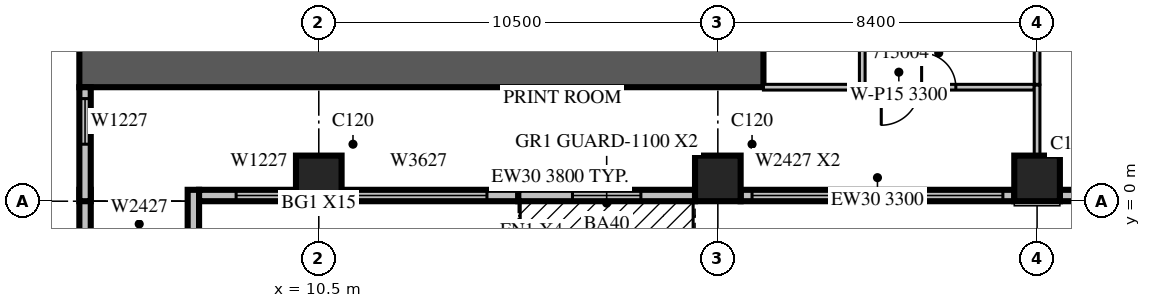
"""IFC4 building model, lengths in metres.
Left out: names, types, materials, properties, quantities, classifications, styles, units other than length and angle.
Written with IfcOpenShell. Run it as: python <this file> out.ifc"""

import sys

from ifc_helpers import new_model, si_unit, direction, frame, frame_2d, origin, origin_2d, place, context, subcontext, project, spatial, rectangle, extrude, source, transform, mapped, element, fill, save


model = new_model("IFC4")
c1 = context("Model", 3, precision=1e-05, world=origin(), true_north=direction((0.0, 1.0)))
c2 = subcontext(c1, "Body", "Model", "MODEL_VIEW")
j1 = project(units=[si_unit("LENGTHUNIT", "METRE"), si_unit("PLANEANGLEUNIT", "RADIAN")], contexts=[c1])
p1 = place(None, origin())
s1 = spatial("IfcSite", under=j1, at=p1, CompositionType="ELEMENT")
p2 = place(p1, origin())
s2 = spatial("IfcBuilding", under=s1, at=p2, CompositionType="ELEMENT")
p3 = place(p2, frame((0.0, 0.0, 74.1)))
s3 = spatial("IfcBuildingStorey", under=s2, at=p3, CompositionType="ELEMENT", Elevation=74.1)
m1 = source(origin(), c2, "Body", "SweptSolid", [
    extrude(rectangle(XDim=1.2, YDim=1.2, at=origin_2d()), origin(), (0.0, 0.0, 1.0), 4.2),
])
for number, where, z_axis, x_axis in (
    (1, (10.5, 0.6, 0.0), (0.0, 0.0, 1.0), (1.0, 0.0, 0.0)),
    (2, (21.0, 0.6, 0.0), (0.0, 0.0, 1.0), (1.0, 0.0, 0.0)),
    (3, (29.4, 0.6, 0.0), (0.0, 0.0, 1.0), (1.0, 0.0, 0.0)),
):
    element("IfcColumn", number, at=place(p3, frame(where, z_axis=z_axis, x_axis=x_axis)), inside=s3, PredefinedType="COLUMN", context=c2, shape_type="MappedRepresentation", body=[
        mapped(m1, transform((0.0, 0.0, 0.0), scale=1.0)),
    ])
m2 = source(origin(), c2, "Body", "SweptSolid", [
    extrude(rectangle(XDim=18.0, YDim=1.2, at=frame_2d((9.0, 0.0))), origin(), (0.0, 0.0, 1.0), 4.2),
])
p4 = place(p3, frame((4.2, 3.6, 0.0), z_axis=(0.0, 0.0, 1.0), x_axis=(1.0, 0.0, 0.0)))
e4 = element("IfcWall", 4, at=p4, inside=s3, PredefinedType="SHEAR", context=c2, shape_type="MappedRepresentation", body=[
    mapped(m2, transform((0.0, 0.0, 0.0), scale=1.0)),
])
m3 = source(origin(), c2, "Body", "SweptSolid", [
    extrude(rectangle(XDim=1.2, YDim=0.3, at=frame_2d((0.6, 0.0))), origin(), (0.0, 0.0, 1.0), 3.8),
])
for number, where, z_axis, x_axis in (
    (5, (4.35, 0.3, 0.0), (0.0, 0.0, 1.0), (0.0, -1.0, 0.0)),
    (6, (7.2, 0.3, 0.0), (0.0, 0.0, 1.0), (0.0, -1.0, 0.0)),
):
    element("IfcWall", number, at=place(p3, frame(where, z_axis=z_axis, x_axis=x_axis)), inside=s3, PredefinedType="STANDARD", context=c2, shape_type="MappedRepresentation", body=[
        mapped(m3, transform((0.0, 0.0, 0.0), scale=1.0)),
    ])
m4 = source(origin(), c2, "Body", "SweptSolid", [
    extrude(rectangle(XDim=2.55, YDim=0.3, at=frame_2d((1.275, 0.0))), origin(), (0.0, 0.0, 1.0), 3.8),
])
p5 = place(p3, frame((7.35, 0.15, 0.0), z_axis=(0.0, 0.0, 1.0), x_axis=(1.0, 0.0, 0.0)))
e7 = element("IfcWall", 7, at=p5, inside=s3, PredefinedType="STANDARD", context=c2, shape_type="MappedRepresentation", body=[
    mapped(m4, transform((0.0, 0.0, 0.0), scale=1.0)),
])
m5 = source(origin(), c2, "Body", "SweptSolid", [
    extrude(rectangle(XDim=1.2, YDim=2.7, at=frame_2d((0.6, 1.35))), frame((0.0, 0.16, 0.0), z_axis=(0.0, -1.0, 0.0), x_axis=(1.0, 0.0, 0.0)), (0.0, 0.0, 1.0), 0.32),
])
p6 = place(p5, frame((0.975, 0.0, 0.6)))
e8 = element("IfcOpeningElement", 8, at=p6, cuts=e7, PredefinedType="OPENING", context=c2, shape_type="MappedRepresentation", body=[
    mapped(m5, transform((0.0, 0.0, 0.0), scale=1.0)),
])
m6 = source(origin(), c2, "Body", "SweptSolid", [
    extrude(rectangle(XDim=4.65, YDim=0.3, at=frame_2d((2.325, 0.0))), origin(), (0.0, 0.0, 1.0), 3.8),
])
p7 = place(p3, frame((11.1, 0.15, 0.0), z_axis=(0.0, 0.0, 1.0), x_axis=(1.0, 0.0, 0.0)))
e9 = element("IfcWall", 9, at=p7, inside=s3, PredefinedType="STANDARD", context=c2, shape_type="MappedRepresentation", body=[
    mapped(m6, transform((0.0, 0.0, 0.0), scale=1.0)),
])
m7 = source(origin(), c2, "Body", "SweptSolid", [
    extrude(rectangle(XDim=3.6, YDim=2.7, at=frame_2d((1.8, 1.35))), frame((0.0, 0.16, 0.0), z_axis=(0.0, -1.0, 0.0), x_axis=(1.0, 0.0, 0.0)), (0.0, 0.0, 1.0), 0.32),
])
p8 = place(p7, frame((0.225, 0.0, 0.6)))
e10 = element("IfcOpeningElement", 10, at=p8, cuts=e9, PredefinedType="OPENING", context=c2, shape_type="MappedRepresentation", body=[
    mapped(m7, transform((0.0, 0.0, 0.0), scale=1.0)),
])
p9 = place(p3, frame((15.75, 0.15, 0.0), z_axis=(0.0, 0.0, 1.0), x_axis=(1.0, 0.0, 0.0)))
e11 = element("IfcWall", 11, at=p9, inside=s3, PredefinedType="STANDARD", context=c2, shape_type="MappedRepresentation", body=[
    mapped(m6, transform((0.0, 0.0, 0.0), scale=1.0)),
])
m8 = source(origin(), c2, "Body", "SweptSolid", [
    extrude(rectangle(XDim=1.8, YDim=2.4, at=frame_2d((0.9, 1.2))), frame((0.0, 0.16, 0.0), z_axis=(0.0, -1.0, 0.0), x_axis=(1.0, 0.0, 0.0)), (0.0, 0.0, 1.0), 0.32),
])
p10 = place(p9, frame((1.425, 0.0, 0.0)))
e12 = element("IfcOpeningElement", 12, at=p10, cuts=e11, PredefinedType="OPENING", context=c2, shape_type="MappedRepresentation", body=[
    mapped(m8, transform((0.0, 0.0, 0.0), scale=1.0)),
])
m9 = source(origin(), c2, "Body", "SweptSolid", [
    extrude(rectangle(XDim=7.2, YDim=0.3, at=frame_2d((3.6, 0.0))), origin(), (0.0, 0.0, 1.0), 3.3),
])
p11 = place(p3, frame((21.6, 0.15, 0.0), z_axis=(0.0, 0.0, 1.0), x_axis=(1.0, 0.0, 0.0)))
e13 = element("IfcWall", 13, at=p11, inside=s3, PredefinedType="STANDARD", context=c2, shape_type="MappedRepresentation", body=[
    mapped(m9, transform((0.0, 0.0, 0.0), scale=1.0)),
])
m10 = source(origin(), c2, "Body", "SweptSolid", [
    extrude(rectangle(XDim=2.4, YDim=2.7, at=frame_2d((1.2, 1.35))), frame((0.0, 0.16, 0.0), z_axis=(0.0, -1.0, 0.0), x_axis=(1.0, 0.0, 0.0)), (0.0, 0.0, 1.0), 0.32),
])
p12 = place(p11, frame((0.3, 0.0, 0.6)))
e14 = element("IfcOpeningElement", 14, at=p12, cuts=e13, PredefinedType="OPENING", context=c2, shape_type="MappedRepresentation", body=[
    mapped(m10, transform((0.0, 0.0, 0.0), scale=1.0)),
])
p13 = place(p11, frame((4.5, 0.0, 0.6)))
e15 = element("IfcOpeningElement", 15, at=p13, cuts=e13, PredefinedType="OPENING", context=c2, shape_type="MappedRepresentation", body=[
    mapped(m10, transform((0.0, 0.0, 0.0), scale=1.0)),
])
m11 = source(origin(), c2, "Body", "SweptSolid", [
    extrude(rectangle(XDim=7.2, YDim=0.3, at=frame_2d((3.6, 0.0))), origin(), (0.0, 0.0, 1.0), 3.8),
])
p14 = place(p3, frame((30.0, 0.15, 0.0), z_axis=(0.0, 0.0, 1.0), x_axis=(1.0, 0.0, 0.0)))
e16 = element("IfcWall", 16, at=p14, inside=s3, PredefinedType="STANDARD", context=c2, shape_type="MappedRepresentation", body=[
    mapped(m11, transform((0.0, 0.0, 0.0), scale=1.0)),
])
p15 = place(p14, frame((2.5, 0.0, 0.6)))
e17 = element("IfcOpeningElement", 17, at=p15, cuts=e16, PredefinedType="OPENING", context=c2, shape_type="MappedRepresentation", body=[
    mapped(m10, transform((0.0, 0.0, 0.0), scale=1.0)),
])
m12 = source(origin(), c2, "Body", "SweptSolid", [
    extrude(rectangle(XDim=3.0, YDim=0.3, at=frame_2d((1.5, 0.0))), origin(), (0.0, 0.0, 1.0), 3.8),
])
p16 = place(p3, frame((4.35, 3.0, 0.0), z_axis=(0.0, 0.0, 1.0), x_axis=(0.0, -1.0, 0.0)))
e18 = element("IfcWall", 18, at=p16, inside=s3, PredefinedType="STANDARD", context=c2, shape_type="MappedRepresentation", body=[
    mapped(m12, transform((0.0, 0.0, 0.0), scale=1.0)),
])
p17 = place(p16, frame((0.3, 0.0, 0.6)))
e19 = element("IfcOpeningElement", 19, at=p17, cuts=e18, PredefinedType="OPENING", context=c2, shape_type="MappedRepresentation", body=[
    mapped(m5, transform((0.0, 0.0, 0.0), scale=1.0)),
])
m13 = source(origin(), c2, "Body", "SweptSolid", [
    extrude(rectangle(XDim=11.925, YDim=0.15, at=frame_2d((5.963, 0.0))), origin(), (0.0, 0.0, 1.0), 2.8),
])
p18 = place(p3, frame((24.8, 15.0, 0.0), z_axis=(0.0, 0.0, 1.0), x_axis=(0.0, -1.0, 0.0)))
e20 = element("IfcWall", 20, at=p18, inside=s3, PredefinedType="PARTITIONING", context=c2, shape_type="MappedRepresentation", body=[
    mapped(m13, transform((0.0, 0.0, 0.0), scale=1.0)),
])
m14 = source(origin(), c2, "Body", "SweptSolid", [
    extrude(rectangle(XDim=0.9, YDim=2.1, at=frame_2d((0.45, 1.05))), frame((0.0, 0.085, 0.0), z_axis=(0.0, -1.0, 0.0), x_axis=(1.0, 0.0, 0.0)), (0.0, 0.0, 1.0), 0.17),
])
p19 = place(p18, frame((8.363, 0.0, 0.0)))
e21 = element("IfcOpeningElement", 21, at=p19, cuts=e20, PredefinedType="OPENING", context=c2, shape_type="MappedRepresentation", body=[
    mapped(m14, transform((0.0, 0.0, 0.0), scale=1.0)),
])
p20 = place(p18, frame((1.525, 0.0, 0.0)))
e22 = element("IfcOpeningElement", 22, at=p20, cuts=e20, PredefinedType="OPENING", context=c2, shape_type="MappedRepresentation", body=[
    mapped(m14, transform((0.0, 0.0, 0.0), scale=1.0)),
])
m15 = source(origin(), c2, "Body", "SweptSolid", [
    extrude(rectangle(XDim=6.826, YDim=0.15, at=frame_2d((3.413, 0.0))), origin(), (0.0, 0.0, 1.0), 3.8),
])
p21 = place(p3, frame((29.4, 3.075, 0.0), z_axis=(0.0, 0.0, 1.0), x_axis=(0.0, 1.0, 0.0)))
e23 = element("IfcWall", 23, at=p21, inside=s3, PredefinedType="PARTITIONING", context=c2, shape_type="MappedRepresentation", body=[
    mapped(m15, transform((0.0, 0.0, 0.0), scale=1.0)),
])
m16 = source(origin(), c2, "Body", "SweptSolid", [
    extrude(rectangle(XDim=7.125, YDim=0.15, at=frame_2d((3.562, 0.0))), origin(), (0.0, 0.0, 1.0), 3.3),
])
p22 = place(p3, frame((22.2, 3.0, 0.0), z_axis=(0.0, 0.0, 1.0), x_axis=(1.0, 0.0, 0.0)))
e24 = element("IfcWall", 24, at=p22, inside=s3, PredefinedType="PARTITIONING", context=c2, shape_type="MappedRepresentation", body=[
    mapped(m16, transform((0.0, 0.0, 0.0), scale=1.0)),
])
m17 = source(origin(), c2, "Body", "SweptSolid", [
    extrude(rectangle(XDim=1.0, YDim=2.1, at=frame_2d((0.5, 1.05))), frame((0.0, 0.085, 0.0), z_axis=(0.0, -1.0, 0.0), x_axis=(1.0, 0.0, 0.0)), (0.0, 0.0, 1.0), 0.17),
])
p23 = place(p22, frame((3.1, 0.0, 0.0)))
e25 = element("IfcOpeningElement", 25, at=p23, cuts=e24, PredefinedType="OPENING", context=c2, shape_type="MappedRepresentation", body=[
    mapped(m17, transform((0.0, 0.0, 0.0), scale=1.0)),
])
p24 = place(p22, frame((4.162, 0.0, 0.0)))
e26 = element("IfcOpeningElement", 26, at=p24, cuts=e24, PredefinedType="OPENING", context=c2, shape_type="MappedRepresentation", body=[
    mapped(m14, transform((0.0, 0.0, 0.0), scale=1.0)),
])
m18 = source(origin(), c2, "Body", "SweptSolid", [
    extrude(rectangle(XDim=1.856, YDim=0.15, at=frame_2d((0.928, 0.0))), origin(), (0.0, 0.0, 1.0), 3.8),
])
p25 = place(p3, frame((29.4, 1.199, 0.0), z_axis=(0.0, 0.0, 1.0), x_axis=(0.0, 1.0, 0.0)))
e27 = element("IfcWall", 27, at=p25, inside=s3, PredefinedType="PARTITIONING", context=c2, shape_type="MappedRepresentation", body=[
    mapped(m18, transform((0.0, 0.0, 0.0), scale=1.0)),
])
m19 = source(origin(), c2, "Body", "SweptSolid", [
    extrude(rectangle(XDim=1.2, YDim=2.7, at=frame_2d((0.6, 1.35))), frame((0.0, 0.03, 0.0), z_axis=(0.0, -1.0, 0.0), x_axis=(1.0, 0.0, 0.0)), (0.0, 0.0, 1.0), 0.06),
])
p26 = place(p6, origin())
e28 = element("IfcWindow", 28, at=p26, inside=s3, PartitioningType="SINGLE_PANEL", PredefinedType="WINDOW", context=c2, shape_type="MappedRepresentation", body=[
    mapped(m19, transform((0.0, 0.0, 0.0), scale=1.0)),
])
fill(e8, e28)
m20 = source(origin(), c2, "Body", "SweptSolid", [
    extrude(rectangle(XDim=3.6, YDim=2.7, at=frame_2d((1.8, 1.35))), frame((0.0, 0.03, 0.0), z_axis=(0.0, -1.0, 0.0), x_axis=(1.0, 0.0, 0.0)), (0.0, 0.0, 1.0), 0.06),
])
p27 = place(p8, origin())
e29 = element("IfcWindow", 29, at=p27, inside=s3, PartitioningType="SINGLE_PANEL", PredefinedType="WINDOW", context=c2, shape_type="MappedRepresentation", body=[
    mapped(m20, transform((0.0, 0.0, 0.0), scale=1.0)),
])
fill(e10, e29)
m21 = source(origin(), c2, "Body", "SweptSolid", [
    extrude(rectangle(XDim=1.8, YDim=2.4, at=frame_2d((0.9, 1.2))), frame((0.0, 0.025, 0.0), z_axis=(0.0, -1.0, 0.0), x_axis=(1.0, 0.0, 0.0)), (0.0, 0.0, 1.0), 0.05),
])
p28 = place(p10, origin())
e30 = element("IfcDoor", 30, at=p28, inside=s3, OperationType="SLIDING_TO_LEFT", PredefinedType="DOOR", context=c2, shape_type="MappedRepresentation", body=[
    mapped(m21, transform((0.0, 0.0, 0.0), scale=1.0)),
])
fill(e12, e30)
m22 = source(origin(), c2, "Body", "SweptSolid", [
    extrude(rectangle(XDim=2.4, YDim=2.7, at=frame_2d((1.2, 1.35))), frame((0.0, 0.03, 0.0), z_axis=(0.0, -1.0, 0.0), x_axis=(1.0, 0.0, 0.0)), (0.0, 0.0, 1.0), 0.06),
])
p29 = place(p12, origin())
e31 = element("IfcWindow", 31, at=p29, inside=s3, PartitioningType="SINGLE_PANEL", PredefinedType="WINDOW", context=c2, shape_type="MappedRepresentation", body=[
    mapped(m22, transform((0.0, 0.0, 0.0), scale=1.0)),
])
fill(e14, e31)
p30 = place(p13, origin())
e32 = element("IfcWindow", 32, at=p30, inside=s3, PartitioningType="SINGLE_PANEL", PredefinedType="WINDOW", context=c2, shape_type="MappedRepresentation", body=[
    mapped(m22, transform((0.0, 0.0, 0.0), scale=1.0)),
])
fill(e15, e32)
p31 = place(p17, origin())
e33 = element("IfcWindow", 33, at=p31, inside=s3, PartitioningType="SINGLE_PANEL", PredefinedType="WINDOW", context=c2, shape_type="MappedRepresentation", body=[
    mapped(m19, transform((0.0, 0.0, 0.0), scale=1.0)),
])
fill(e19, e33)
m23 = source(origin(), c2, "Body", "SweptSolid", [
    extrude(rectangle(XDim=1.0, YDim=2.1, at=frame_2d((0.5, 1.05))), frame((0.0, 0.025, 0.0), z_axis=(0.0, -1.0, 0.0), x_axis=(1.0, 0.0, 0.0)), (0.0, 0.0, 1.0), 0.05),
])
p32 = place(p23, origin())
e34 = element("IfcDoor", 34, at=p32, inside=s3, OperationType="SINGLE_SWING_RIGHT", PredefinedType="DOOR", context=c2, shape_type="MappedRepresentation", body=[
    mapped(m23, transform((0.0, 0.0, 0.0), scale=1.0)),
])
fill(e25, e34)
m24 = source(origin(), c2, "Body", "SweptSolid", [
    extrude(rectangle(XDim=0.9, YDim=2.1, at=frame_2d((0.45, 1.05))), frame((0.0, 0.025, 0.0), z_axis=(0.0, -1.0, 0.0), x_axis=(1.0, 0.0, 0.0)), (0.0, 0.0, 1.0), 0.05),
])
p33 = place(p24, origin())
e35 = element("IfcDoor", 35, at=p33, inside=s3, OperationType="SINGLE_SWING_LEFT", PredefinedType="DOOR", context=c2, shape_type="MappedRepresentation", body=[
    mapped(m24, transform((0.0, 0.0, 0.0), scale=1.0)),
])
fill(e26, e35)
save(model, sys.argv[1])
